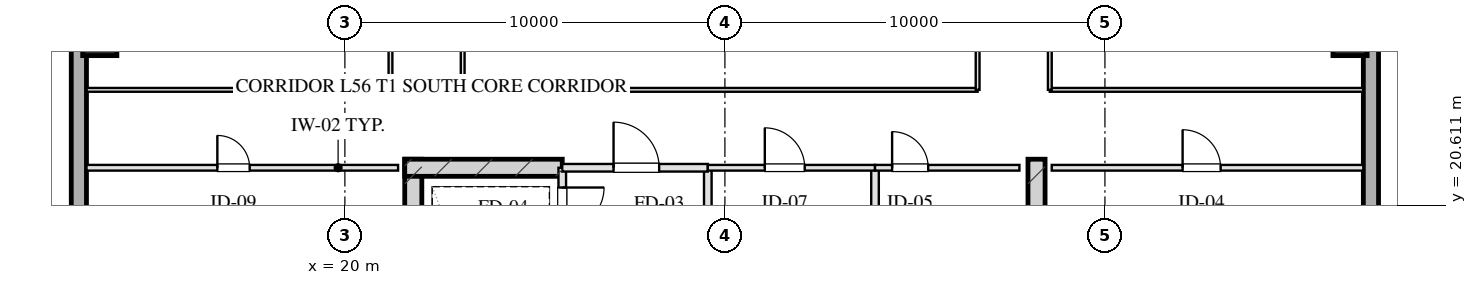
"""IFC4 building model, lengths in metres.
Left out: names, types, materials, properties, quantities, classifications, styles, units other than length and angle.
Written with IfcOpenShell. Run it as: python <this file> out.ifc"""

import sys

from ifc_helpers import new_model, si_unit, direction, frame, frame_2d, origin, origin_2d, place, context, subcontext, project, spatial, rectangle, hollow_rectangle, extrude, element, fill, save


model = new_model("IFC4")
c1 = context("Model", 3, precision=1e-05, world=origin(), true_north=direction((0.0, 1.0)))
c2 = subcontext(c1, "Body", "Model", "MODEL_VIEW")
j1 = project(units=[si_unit("LENGTHUNIT", "METRE"), si_unit("PLANEANGLEUNIT", "RADIAN")], contexts=[c1])
p1 = place(None, origin())
s1 = spatial("IfcSite", under=j1, at=p1, CompositionType="ELEMENT")
p2 = place(p1, origin())
s2 = spatial("IfcBuilding", under=s1, at=p2, CompositionType="ELEMENT")
p3 = place(p2, frame((0.0, 0.0, 209.3)))
s3 = spatial("IfcBuildingStorey", under=s2, at=p3, CompositionType="ELEMENT", Elevation=209.3)
for number, where, z_axis, x_axis in (
    (1, (21.8, 21.825, 0.0), (0.0, 0.0, 1.0), (0.0, -1.0, 0.0)),
    (2, (38.2, 21.825, 0.0), (0.0, 0.0, 1.0), (0.0, -1.0, 0.0)),
):
    element("IfcWall", number, at=place(p3, frame(where, z_axis=z_axis, x_axis=x_axis)), inside=s3, PredefinedType="SHEAR", context=c2, shape_type="SweptSolid", body=[
        extrude(rectangle(XDim=9.33, YDim=0.45, at=frame_2d((4.665, 0.0))), origin(), (0.0, 0.0, 1.0), 3.45),
    ])
p4 = place(p3, frame((21.575, 21.6, 0.0), z_axis=(0.0, 0.0, 1.0), x_axis=(1.0, 0.0, 0.0)))
e3 = element("IfcWall", 3, at=p4, inside=s3, PredefinedType="SHEAR", context=c2, shape_type="SweptSolid", body=[
    extrude(rectangle(XDim=4.145, YDim=0.45, at=frame_2d((2.073, 0.0))), origin(), (0.0, 0.0, 1.0), 3.45),
])
for number, where, z_axis, x_axis in (
    (4, (13.55, 25.0, 0.0), (0.0, 0.0, 1.0), (1.0, 0.0, 0.0)),
    (5, (46.45, 25.0, 0.0), (0.0, 0.0, 1.0), (1.0, 0.0, 0.0)),
):
    element("IfcColumn", number, at=place(p3, frame(where, z_axis=z_axis, x_axis=x_axis)), inside=s3, PredefinedType="COLUMN", context=c2, shape_type="SweptSolid", body=[
        extrude(hollow_rectangle(XDim=0.9, YDim=0.9, WallThickness=0.032, at=origin_2d()), origin(), (0.0, 0.0, 1.0), 3.451),
    ])
p5 = place(p3, frame((13.0, 10.8, 0.0), z_axis=(0.0, 0.0, 1.0), x_axis=(0.0, 1.0, 0.0)))
e6 = element("IfcWall", 6, at=p5, inside=s3, PredefinedType="SOLIDWALL", context=c2, shape_type="SweptSolid", body=[
    extrude(rectangle(XDim=46.4, YDim=0.4, at=frame_2d((23.2, 0.0))), origin(), (0.0, 0.0, 1.0), 2.61),
])
p6 = place(p5, frame((24.75, 0.0, 0.75)))
e7 = element("IfcOpeningElement", 7, at=p6, cuts=e6, PredefinedType="OPENING", context=c2, shape_type="SweptSolid", body=[
    extrude(rectangle(XDim=2.1, YDim=1.46, at=frame_2d((1.05, 0.73))), frame((0.0, 0.21, 0.0), z_axis=(0.0, -1.0, 0.0), x_axis=(1.0, 0.0, 0.0)), (0.0, 0.0, 1.0), 0.42),
])
p7 = place(p5, frame((28.55, 0.0, 0.75)))
e8 = element("IfcOpeningElement", 8, at=p7, cuts=e6, PredefinedType="OPENING", context=c2, shape_type="SweptSolid", body=[
    extrude(rectangle(XDim=2.1, YDim=1.46, at=frame_2d((1.05, 0.73))), frame((0.0, 0.21, 0.0), z_axis=(0.0, -1.0, 0.0), x_axis=(1.0, 0.0, 0.0)), (0.0, 0.0, 1.0), 0.42),
])
p8 = place(p5, frame((19.55, 0.0, 0.0)))
e9 = element("IfcOpeningElement", 9, at=p8, cuts=e6, PredefinedType="OPENING", context=c2, shape_type="SweptSolid", body=[
    extrude(rectangle(XDim=1.1, YDim=2.15, at=frame_2d((0.55, 1.075))), frame((0.0, 0.21, 0.0), z_axis=(0.0, -1.0, 0.0), x_axis=(1.0, 0.0, 0.0)), (0.0, 0.0, 1.0), 0.42),
])
p9 = place(p3, frame((47.0, 57.2, 0.0), z_axis=(0.0, 0.0, 1.0), x_axis=(0.0, -1.0, 0.0)))
e10 = element("IfcWall", 10, at=p9, inside=s3, PredefinedType="SOLIDWALL", context=c2, shape_type="SweptSolid", body=[
    extrude(rectangle(XDim=46.4, YDim=0.4, at=frame_2d((23.2, 0.0))), origin(), (0.0, 0.0, 1.0), 2.61),
])
p10 = place(p9, frame((19.55, 0.0, 0.75)))
e11 = element("IfcOpeningElement", 11, at=p10, cuts=e10, PredefinedType="OPENING", context=c2, shape_type="SweptSolid", body=[
    extrude(rectangle(XDim=2.1, YDim=1.46, at=frame_2d((1.05, 0.73))), frame((0.0, 0.21, 0.0), z_axis=(0.0, -1.0, 0.0), x_axis=(1.0, 0.0, 0.0)), (0.0, 0.0, 1.0), 0.42),
])
p11 = place(p9, frame((15.75, 0.0, 0.75)))
e12 = element("IfcOpeningElement", 12, at=p11, cuts=e10, PredefinedType="OPENING", context=c2, shape_type="SweptSolid", body=[
    extrude(rectangle(XDim=2.1, YDim=1.46, at=frame_2d((1.05, 0.73))), frame((0.0, 0.21, 0.0), z_axis=(0.0, -1.0, 0.0), x_axis=(1.0, 0.0, 0.0)), (0.0, 0.0, 1.0), 0.42),
])
p12 = place(p9, frame((28.45, 0.0, 0.0)))
e13 = element("IfcOpeningElement", 13, at=p12, cuts=e10, PredefinedType="OPENING", context=c2, shape_type="SweptSolid", body=[
    extrude(rectangle(XDim=1.1, YDim=2.15, at=frame_2d((0.55, 1.075))), frame((0.0, 0.21, 0.0), z_axis=(0.0, -1.0, 0.0), x_axis=(1.0, 0.0, 0.0)), (0.0, 0.0, 1.0), 0.42),
])
p13 = place(p3, frame((25.72, 21.6, 0.0), z_axis=(0.0, 0.0, 1.0), x_axis=(0.0, -1.0, 0.0)))
e14 = element("IfcWall", 14, at=p13, inside=s3, PredefinedType="PARTITIONING", context=c2, shape_type="SweptSolid", body=[
    extrude(rectangle(XDim=1.9, YDim=0.2, at=frame_2d((0.95, 0.0))), origin(), (0.0, 0.0, 1.0), 3.175),
])
p14 = place(p13, frame((0.52, 0.0, 0.0)))
e15 = element("IfcOpeningElement", 15, at=p14, cuts=e14, PredefinedType="OPENING", context=c2, shape_type="SweptSolid", body=[
    extrude(rectangle(XDim=1.1, YDim=2.05, at=frame_2d((0.55, 1.025))), frame((0.0, 0.11, 0.0), z_axis=(0.0, -1.0, 0.0), x_axis=(1.0, 0.0, 0.0)), (0.0, 0.0, 1.0), 0.22),
])
p15 = place(p3, frame((29.55, 21.6, 0.0), z_axis=(0.0, 0.0, 1.0), x_axis=(0.0, -1.0, 0.0)))
e16 = element("IfcWall", 16, at=p15, inside=s3, PredefinedType="PARTITIONING", context=c2, shape_type="SweptSolid", body=[
    extrude(rectangle(XDim=8.43, YDim=0.2, at=frame_2d((4.215, 0.0))), origin(), (0.0, 0.0, 1.0), 3.175),
])
p16 = place(p3, frame((25.72, 21.6, 0.0), z_axis=(0.0, 0.0, 1.0), x_axis=(1.0, 0.0, 0.0)))
e17 = element("IfcWall", 17, at=p16, inside=s3, PredefinedType="PARTITIONING", context=c2, shape_type="SweptSolid", body=[
    extrude(rectangle(XDim=3.83, YDim=0.2, at=frame_2d((1.915, 0.0))), origin(), (0.0, 0.0, 1.0), 3.175),
])
p17 = place(p16, frame((1.35, 0.0, 0.0)))
e18 = element("IfcOpeningElement", 18, at=p17, cuts=e17, PredefinedType="OPENING", context=c2, shape_type="SweptSolid", body=[
    extrude(rectangle(XDim=1.2, YDim=2.05, at=frame_2d((0.6, 1.025))), frame((0.0, 0.11, 0.0), z_axis=(0.0, -1.0, 0.0), x_axis=(1.0, 0.0, 0.0)), (0.0, 0.0, 1.0), 0.22),
])
p18 = place(p3, frame((33.95, 21.6, 0.0), z_axis=(0.0, 0.0, 1.0), x_axis=(0.0, -1.0, 0.0)))
e19 = element("IfcWall", 19, at=p18, inside=s3, PredefinedType="PARTITIONING", context=c2, shape_type="SweptSolid", body=[
    extrude(rectangle(XDim=8.43, YDim=0.2, at=frame_2d((4.215, 0.0))), origin(), (0.0, 0.0, 1.0), 3.175),
])
p19 = place(p3, frame((29.55, 21.6, 0.0), z_axis=(0.0, 0.0, 1.0), x_axis=(1.0, 0.0, 0.0)))
e20 = element("IfcWall", 20, at=p19, inside=s3, PredefinedType="PARTITIONING", context=c2, shape_type="SweptSolid", body=[
    extrude(rectangle(XDim=4.4, YDim=0.15, at=frame_2d((2.2, 0.0))), origin(), (0.0, 0.0, 1.0), 3.175),
])
p20 = place(p19, frame((1.5, 0.0, 0.0)))
e21 = element("IfcOpeningElement", 21, at=p20, cuts=e20, PredefinedType="OPENING", context=c2, shape_type="SweptSolid", body=[
    extrude(rectangle(XDim=1.05, YDim=2.05, at=frame_2d((0.525, 1.025))), frame((0.0, 0.085, 0.0), z_axis=(0.0, -1.0, 0.0), x_axis=(1.0, 0.0, 0.0)), (0.0, 0.0, 1.0), 0.17),
])
p21 = place(p3, frame((33.95, 21.6, 0.0), z_axis=(0.0, 0.0, 1.0), x_axis=(1.0, 0.0, 0.0)))
e22 = element("IfcWall", 22, at=p21, inside=s3, PredefinedType="PARTITIONING", context=c2, shape_type="SweptSolid", body=[
    extrude(rectangle(XDim=3.8, YDim=0.15, at=frame_2d((1.9, 0.0))), origin(), (0.0, 0.0, 1.0), 3.175),
])
p22 = place(p21, frame((0.45, 0.0, 0.0)))
e23 = element("IfcOpeningElement", 23, at=p22, cuts=e22, PredefinedType="OPENING", context=c2, shape_type="SweptSolid", body=[
    extrude(rectangle(XDim=0.95, YDim=2.05, at=frame_2d((0.475, 1.025))), frame((0.0, 0.085, 0.0), z_axis=(0.0, -1.0, 0.0), x_axis=(1.0, 0.0, 0.0)), (0.0, 0.0, 1.0), 0.17),
])
p23 = place(p3, frame((13.2, 21.6, 0.0), z_axis=(0.0, 0.0, 1.0), x_axis=(1.0, 0.0, 0.0)))
e24 = element("IfcWall", 24, at=p23, inside=s3, PredefinedType="PARTITIONING", context=c2, shape_type="SweptSolid", body=[
    extrude(rectangle(XDim=8.2, YDim=0.15, at=frame_2d((4.1, 0.0))), origin(), (0.0, 0.0, 1.0), 3.175),
])
p24 = place(p23, frame((3.444, 0.0, 0.0)))
e25 = element("IfcOpeningElement", 25, at=p24, cuts=e24, PredefinedType="OPENING", context=c2, shape_type="SweptSolid", body=[
    extrude(rectangle(XDim=0.85, YDim=2.05, at=frame_2d((0.425, 1.025))), frame((0.0, 0.085, 0.0), z_axis=(0.0, -1.0, 0.0), x_axis=(1.0, 0.0, 0.0)), (0.0, 0.0, 1.0), 0.17),
])
p25 = place(p3, frame((38.6, 21.6, 0.0), z_axis=(0.0, 0.0, 1.0), x_axis=(1.0, 0.0, 0.0)))
e26 = element("IfcWall", 26, at=p25, inside=s3, PredefinedType="PARTITIONING", context=c2, shape_type="SweptSolid", body=[
    extrude(rectangle(XDim=8.2, YDim=0.15, at=frame_2d((4.1, 0.0))), origin(), (0.0, 0.0, 1.0), 3.175),
])
p26 = place(p25, frame((3.444, 0.0, 0.0)))
e27 = element("IfcOpeningElement", 27, at=p26, cuts=e26, PredefinedType="OPENING", context=c2, shape_type="SweptSolid", body=[
    extrude(rectangle(XDim=1.0, YDim=2.05, at=frame_2d((0.5, 1.025))), frame((0.0, 0.085, 0.0), z_axis=(0.0, -1.0, 0.0), x_axis=(1.0, 0.0, 0.0)), (0.0, 0.0, 1.0), 0.17),
])
p27 = place(p3, frame((13.2, 23.65, 0.0), z_axis=(0.0, 0.0, 1.0), x_axis=(1.0, 0.0, 0.0)))
e28 = element("IfcWall", 28, at=p27, inside=s3, PredefinedType="MOVABLE", context=c2, shape_type="SweptSolid", body=[
    extrude(rectangle(XDim=8.0, YDim=0.1, at=frame_2d((4.0, 0.0))), origin(), (0.0, 0.0, 1.0), 3.175),
])
p28 = place(p3, frame((23.1, 23.65, 0.0), z_axis=(0.0, 0.0, 1.0), x_axis=(1.0, 0.0, 0.0)))
e29 = element("IfcWall", 29, at=p28, inside=s3, PredefinedType="MOVABLE", context=c2, shape_type="SweptSolid", body=[
    extrude(rectangle(XDim=13.55, YDim=0.1, at=frame_2d((6.775, 0.0))), origin(), (0.0, 0.0, 1.0), 3.175),
])
p29 = place(p3, frame((38.55, 23.65, 0.0), z_axis=(0.0, 0.0, 1.0), x_axis=(1.0, 0.0, 0.0)))
e30 = element("IfcWall", 30, at=p29, inside=s3, PredefinedType="MOVABLE", context=c2, shape_type="SweptSolid", body=[
    extrude(rectangle(XDim=8.25, YDim=0.1, at=frame_2d((4.125, 0.0))), origin(), (0.0, 0.0, 1.0), 3.175),
])
p30 = place(p3, frame((21.2, 23.65, 0.0), z_axis=(0.0, 0.0, 1.0), x_axis=(0.0, 1.0, 0.0)))
e31 = element("IfcWall", 31, at=p30, inside=s3, PredefinedType="MOVABLE", context=c2, shape_type="SweptSolid", body=[
    extrude(rectangle(XDim=20.7, YDim=0.1, at=frame_2d((10.35, 0.0))), origin(), (0.0, 0.0, 1.0), 3.175),
])
p31 = place(p30, frame((2.175, 0.0, 0.0)))
e32 = element("IfcOpeningElement", 32, at=p31, cuts=e31, PredefinedType="OPENING", context=c2, shape_type="SweptSolid", body=[
    extrude(rectangle(XDim=1.05, YDim=2.05, at=frame_2d((0.525, 1.025))), frame((0.0, 0.06, 0.0), z_axis=(0.0, -1.0, 0.0), x_axis=(1.0, 0.0, 0.0)), (0.0, 0.0, 1.0), 0.12),
])
p32 = place(p30, frame((6.75, 0.0, 0.0)))
e33 = element("IfcOpeningElement", 33, at=p32, cuts=e31, PredefinedType="OPENING", context=c2, shape_type="SweptSolid", body=[
    extrude(rectangle(XDim=1.0, YDim=2.05, at=frame_2d((0.5, 1.025))), frame((0.0, 0.06, 0.0), z_axis=(0.0, -1.0, 0.0), x_axis=(1.0, 0.0, 0.0)), (0.0, 0.0, 1.0), 0.12),
])
p33 = place(p30, frame((9.85, 0.0, 0.0)))
e34 = element("IfcOpeningElement", 34, at=p33, cuts=e31, PredefinedType="OPENING", context=c2, shape_type="SweptSolid", body=[
    extrude(rectangle(XDim=1.0, YDim=2.05, at=frame_2d((0.5, 1.025))), frame((0.0, 0.06, 0.0), z_axis=(0.0, -1.0, 0.0), x_axis=(1.0, 0.0, 0.0)), (0.0, 0.0, 1.0), 0.12),
])
p34 = place(p30, frame((12.95, 0.0, 0.0)))
e35 = element("IfcOpeningElement", 35, at=p34, cuts=e31, PredefinedType="OPENING", context=c2, shape_type="SweptSolid", body=[
    extrude(rectangle(XDim=1.0, YDim=2.05, at=frame_2d((0.5, 1.025))), frame((0.0, 0.06, 0.0), z_axis=(0.0, -1.0, 0.0), x_axis=(1.0, 0.0, 0.0)), (0.0, 0.0, 1.0), 0.12),
])
p35 = place(p30, frame((17.525, 0.0, 0.0)))
e36 = element("IfcOpeningElement", 36, at=p35, cuts=e31, PredefinedType="OPENING", context=c2, shape_type="SweptSolid", body=[
    extrude(rectangle(XDim=1.0, YDim=2.05, at=frame_2d((0.5, 1.025))), frame((0.0, 0.06, 0.0), z_axis=(0.0, -1.0, 0.0), x_axis=(1.0, 0.0, 0.0)), (0.0, 0.0, 1.0), 0.12),
])
p36 = place(p3, frame((23.1, 23.65, 0.0), z_axis=(0.0, 0.0, 1.0), x_axis=(0.0, 1.0, 0.0)))
e37 = element("IfcWall", 37, at=p36, inside=s3, PredefinedType="MOVABLE", context=c2, shape_type="SweptSolid", body=[
    extrude(rectangle(XDim=20.7, YDim=0.1, at=frame_2d((10.35, 0.0))), origin(), (0.0, 0.0, 1.0), 3.175),
])
p37 = place(p36, frame((2.857, 0.0, 0.0)))
e38 = element("IfcOpeningElement", 38, at=p37, cuts=e37, PredefinedType="OPENING", context=c2, shape_type="SweptSolid", body=[
    extrude(rectangle(XDim=1.1, YDim=2.05, at=frame_2d((0.55, 1.025))), frame((0.0, 0.06, 0.0), z_axis=(0.0, -1.0, 0.0), x_axis=(1.0, 0.0, 0.0)), (0.0, 0.0, 1.0), 0.12),
])
p38 = place(p36, frame((17.208, 0.0, 0.0)))
e39 = element("IfcOpeningElement", 39, at=p38, cuts=e37, PredefinedType="OPENING", context=c2, shape_type="SweptSolid", body=[
    extrude(rectangle(XDim=1.1, YDim=2.05, at=frame_2d((0.55, 1.025))), frame((0.0, 0.06, 0.0), z_axis=(0.0, -1.0, 0.0), x_axis=(1.0, 0.0, 0.0)), (0.0, 0.0, 1.0), 0.12),
])
p39 = place(p3, frame((36.65, 23.65, 0.0), z_axis=(0.0, 0.0, 1.0), x_axis=(0.0, 1.0, 0.0)))
e40 = element("IfcWall", 40, at=p39, inside=s3, PredefinedType="MOVABLE", context=c2, shape_type="SweptSolid", body=[
    extrude(rectangle(XDim=20.7, YDim=0.1, at=frame_2d((10.35, 0.0))), origin(), (0.0, 0.0, 1.0), 3.175),
])
p40 = place(p39, frame((9.71, 0.0, 0.0)))
e41 = element("IfcOpeningElement", 41, at=p40, cuts=e40, PredefinedType="OPENING", context=c2, shape_type="SweptSolid", body=[
    extrude(rectangle(XDim=1.1, YDim=2.05, at=frame_2d((0.55, 1.025))), frame((0.0, 0.06, 0.0), z_axis=(0.0, -1.0, 0.0), x_axis=(1.0, 0.0, 0.0)), (0.0, 0.0, 1.0), 0.12),
])
p41 = place(p3, frame((38.55, 23.65, 0.0), z_axis=(0.0, 0.0, 1.0), x_axis=(0.0, 1.0, 0.0)))
e42 = element("IfcWall", 42, at=p41, inside=s3, PredefinedType="MOVABLE", context=c2, shape_type="SweptSolid", body=[
    extrude(rectangle(XDim=20.7, YDim=0.1, at=frame_2d((10.35, 0.0))), origin(), (0.0, 0.0, 1.0), 3.175),
])
p42 = place(p41, frame((2.675, 0.0, 0.0)))
e43 = element("IfcOpeningElement", 43, at=p42, cuts=e42, PredefinedType="OPENING", context=c2, shape_type="SweptSolid", body=[
    extrude(rectangle(XDim=1.0, YDim=2.05, at=frame_2d((0.5, 1.025))), frame((0.0, 0.06, 0.0), z_axis=(0.0, -1.0, 0.0), x_axis=(1.0, 0.0, 0.0)), (0.0, 0.0, 1.0), 0.12),
])
p43 = place(p41, frame((9.85, 0.0, 0.0)))
e44 = element("IfcOpeningElement", 44, at=p43, cuts=e42, PredefinedType="OPENING", context=c2, shape_type="SweptSolid", body=[
    extrude(rectangle(XDim=1.0, YDim=2.05, at=frame_2d((0.5, 1.025))), frame((0.0, 0.06, 0.0), z_axis=(0.0, -1.0, 0.0), x_axis=(1.0, 0.0, 0.0)), (0.0, 0.0, 1.0), 0.12),
])
p44 = place(p41, frame((17.025, 0.0, 0.0)))
e45 = element("IfcOpeningElement", 45, at=p44, cuts=e42, PredefinedType="OPENING", context=c2, shape_type="SweptSolid", body=[
    extrude(rectangle(XDim=1.0, YDim=2.05, at=frame_2d((0.5, 1.025))), frame((0.0, 0.06, 0.0), z_axis=(0.0, -1.0, 0.0), x_axis=(1.0, 0.0, 0.0)), (0.0, 0.0, 1.0), 0.12),
])
p45 = place(p14, origin())
e46 = element("IfcDoor", 46, at=p45, inside=s3, OperationType="SINGLE_SWING_LEFT", PredefinedType="DOOR", context=c2, shape_type="SweptSolid", body=[
    extrude(rectangle(XDim=1.1, YDim=2.05, at=frame_2d((0.55, 1.025))), frame((0.0, 0.025, 0.0), z_axis=(0.0, -1.0, 0.0), x_axis=(1.0, 0.0, 0.0)), (0.0, 0.0, 1.0), 0.05),
])
fill(e15, e46)
p46 = place(p17, origin())
e47 = element("IfcDoor", 47, at=p46, inside=s3, OperationType="SINGLE_SWING_LEFT", PredefinedType="DOOR", context=c2, shape_type="SweptSolid", body=[
    extrude(rectangle(XDim=1.2, YDim=2.05, at=frame_2d((0.6, 1.025))), frame((0.0, 0.025, 0.0), z_axis=(0.0, -1.0, 0.0), x_axis=(1.0, 0.0, 0.0)), (0.0, 0.0, 1.0), 0.05),
])
fill(e18, e47)
p47 = place(p20, origin())
e48 = element("IfcDoor", 48, at=p47, inside=s3, OperationType="SINGLE_SWING_LEFT", PredefinedType="DOOR", context=c2, shape_type="SweptSolid", body=[
    extrude(rectangle(XDim=1.05, YDim=2.05, at=frame_2d((0.525, 1.025))), frame((0.0, 0.025, 0.0), z_axis=(0.0, -1.0, 0.0), x_axis=(1.0, 0.0, 0.0)), (0.0, 0.0, 1.0), 0.05),
])
fill(e21, e48)
p48 = place(p22, origin())
e49 = element("IfcDoor", 49, at=p48, inside=s3, OperationType="SINGLE_SWING_LEFT", PredefinedType="DOOR", context=c2, shape_type="SweptSolid", body=[
    extrude(rectangle(XDim=0.95, YDim=2.05, at=frame_2d((0.475, 1.025))), frame((0.0, 0.025, 0.0), z_axis=(0.0, -1.0, 0.0), x_axis=(1.0, 0.0, 0.0)), (0.0, 0.0, 1.0), 0.05),
])
fill(e23, e49)
p49 = place(p24, origin())
e50 = element("IfcDoor", 50, at=p49, inside=s3, OperationType="SINGLE_SWING_LEFT", PredefinedType="DOOR", context=c2, shape_type="SweptSolid", body=[
    extrude(rectangle(XDim=0.85, YDim=2.05, at=frame_2d((0.425, 1.025))), frame((0.0, 0.025, 0.0), z_axis=(0.0, -1.0, 0.0), x_axis=(1.0, 0.0, 0.0)), (0.0, 0.0, 1.0), 0.05),
])
fill(e25, e50)
p50 = place(p26, origin())
e51 = element("IfcDoor", 51, at=p50, inside=s3, OperationType="SINGLE_SWING_LEFT", PredefinedType="DOOR", context=c2, shape_type="SweptSolid", body=[
    extrude(rectangle(XDim=1.0, YDim=2.05, at=frame_2d((0.5, 1.025))), frame((0.0, 0.025, 0.0), z_axis=(0.0, -1.0, 0.0), x_axis=(1.0, 0.0, 0.0)), (0.0, 0.0, 1.0), 0.05),
])
fill(e27, e51)
save(model, sys.argv[1])
